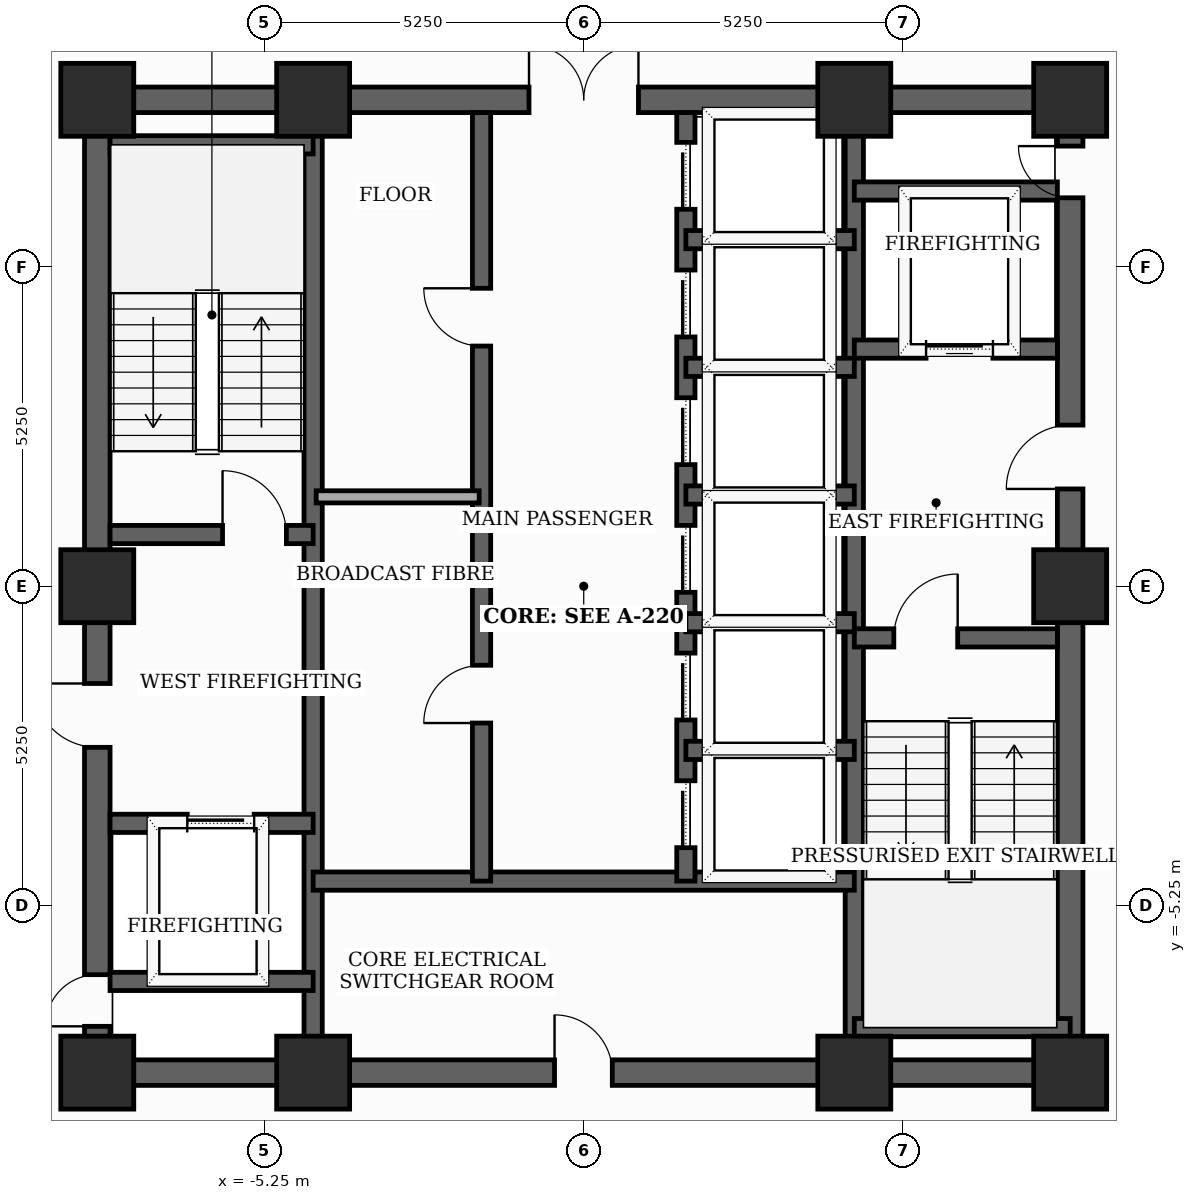
"""IFC4 building model, lengths in metres.
Left out: names, types, materials, properties, quantities, classifications, styles, units other than length and angle.
Written with IfcOpenShell. Run it as: python <this file> out.ifc"""

import sys

from ifc_helpers import new_model, si_unit, direction, frame, frame_2d, origin, origin_2d, place, context, subcontext, project, spatial, rectangle, extrude, element, fill, save


model = new_model("IFC4")
c1 = context("Model", 3, precision=1e-05, world=origin(), true_north=direction((0.0, 1.0)))
c2 = subcontext(c1, "Body", "Model", "MODEL_VIEW")
j1 = project(units=[si_unit("LENGTHUNIT", "METRE"), si_unit("PLANEANGLEUNIT", "RADIAN")], contexts=[c1])
p1 = place(None, origin())
s1 = spatial("IfcSite", under=j1, at=p1, CompositionType="ELEMENT")
p2 = place(p1, origin())
s2 = spatial("IfcBuilding", under=s1, at=p2, CompositionType="ELEMENT")
p3 = place(p2, frame((0.0, 0.0, 184.2)))
s3 = spatial("IfcBuildingStorey", under=s2, at=p3, CompositionType="ELEMENT", Elevation=184.2)
for number, where, z_axis, x_axis in (
    (1, (-8.0, -8.0, 0.0), (0.0, 0.0, 1.0), (1.0, 0.0, 0.0)),
    (2, (-4.45, -8.0, 0.0), (0.0, 0.0, 1.0), (1.0, 0.0, 0.0)),
    (3, (4.45, -8.0, 0.0), (0.0, 0.0, 1.0), (1.0, 0.0, 0.0)),
    (4, (8.0, -8.0, 0.0), (0.0, 0.0, 1.0), (1.0, 0.0, 0.0)),
    (5, (8.0, 0.0, 0.0), (0.0, 0.0, 1.0), (1.0, 0.0, 0.0)),
    (6, (8.0, 8.0, 0.0), (0.0, 0.0, 1.0), (1.0, 0.0, 0.0)),
    (7, (4.45, 8.0, 0.0), (0.0, 0.0, 1.0), (1.0, 0.0, 0.0)),
    (8, (-4.45, 8.0, 0.0), (0.0, 0.0, 1.0), (1.0, 0.0, 0.0)),
    (9, (-8.0, 8.0, 0.0), (0.0, 0.0, 1.0), (1.0, 0.0, 0.0)),
    (10, (-8.0, 0.0, 0.0), (0.0, 0.0, 1.0), (1.0, 0.0, 0.0)),
):
    element("IfcColumn", number, at=place(p3, frame(where, z_axis=z_axis, x_axis=x_axis)), inside=s3, PredefinedType="COLUMN", context=c2, shape_type="SweptSolid", body=[
        extrude(rectangle(XDim=1.2, YDim=1.2, at=origin_2d()), origin(), (0.0, 0.0, 1.0), 3.7),
    ])
p4 = place(p3, frame((-8.0, -8.0, 0.0), z_axis=(0.0, 0.0, 1.0), x_axis=(0.0, 1.0, 0.0)))
e11 = element("IfcWall", 11, at=p4, inside=s3, PredefinedType="SHEAR", context=c2, shape_type="SweptSolid", body=[
    extrude(rectangle(XDim=16.0, YDim=0.42, at=frame_2d((8.0, 0.0))), origin(), (0.0, 0.0, 1.0), 3.5),
])
p5 = place(p4, frame((0.761, 0.0, 0.0)))
e12 = element("IfcOpeningElement", 12, at=p5, cuts=e11, PredefinedType="OPENING", context=c2, shape_type="SweptSolid", body=[
    extrude(rectangle(XDim=0.85, YDim=2.02, at=frame_2d((0.425, 1.01))), frame((0.0, 0.22, 0.0), z_axis=(0.0, -1.0, 0.0), x_axis=(1.0, 0.0, 0.0)), (0.0, 0.0, 1.0), 0.44),
])
p6 = place(p4, frame((5.35, 0.0, 0.0)))
e13 = element("IfcOpeningElement", 13, at=p6, cuts=e11, PredefinedType="OPENING", context=c2, shape_type="SweptSolid", body=[
    extrude(rectangle(XDim=1.05, YDim=2.15, at=frame_2d((0.525, 1.075))), frame((0.0, 0.22, 0.0), z_axis=(0.0, -1.0, 0.0), x_axis=(1.0, 0.0, 0.0)), (0.0, 0.0, 1.0), 0.44),
])
p7 = place(p3, frame((8.0, -8.0, 0.0), z_axis=(0.0, 0.0, 1.0), x_axis=(0.0, 1.0, 0.0)))
e14 = element("IfcWall", 14, at=p7, inside=s3, PredefinedType="SHEAR", context=c2, shape_type="SweptSolid", body=[
    extrude(rectangle(XDim=16.0, YDim=0.42, at=frame_2d((8.0, 0.0))), origin(), (0.0, 0.0, 1.0), 3.5),
])
p8 = place(p7, frame((9.6, 0.0, 0.0)))
e15 = element("IfcOpeningElement", 15, at=p8, cuts=e14, PredefinedType="OPENING", context=c2, shape_type="SweptSolid", body=[
    extrude(rectangle(XDim=1.05, YDim=2.15, at=frame_2d((0.525, 1.075))), frame((0.0, 0.22, 0.0), z_axis=(0.0, -1.0, 0.0), x_axis=(1.0, 0.0, 0.0)), (0.0, 0.0, 1.0), 0.44),
])
p9 = place(p7, frame((14.389, 0.0, 0.0)))
e16 = element("IfcOpeningElement", 16, at=p9, cuts=e14, PredefinedType="OPENING", context=c2, shape_type="SweptSolid", body=[
    extrude(rectangle(XDim=0.85, YDim=2.02, at=frame_2d((0.425, 1.01))), frame((0.0, 0.22, 0.0), z_axis=(0.0, -1.0, 0.0), x_axis=(1.0, 0.0, 0.0)), (0.0, 0.0, 1.0), 0.44),
])
p10 = place(p3, frame((-8.0, -8.0, 0.0), z_axis=(0.0, 0.0, 1.0), x_axis=(1.0, 0.0, 0.0)))
e17 = element("IfcWall", 17, at=p10, inside=s3, PredefinedType="SHEAR", context=c2, shape_type="SweptSolid", body=[
    extrude(rectangle(XDim=16.0, YDim=0.42, at=frame_2d((8.0, 0.0))), origin(), (0.0, 0.0, 1.0), 3.5),
])
p11 = place(p10, frame((7.52, 0.0, 0.0)))
e18 = element("IfcOpeningElement", 18, at=p11, cuts=e17, PredefinedType="OPENING", context=c2, shape_type="SweptSolid", body=[
    extrude(rectangle(XDim=0.95, YDim=2.1, at=frame_2d((0.475, 1.05))), frame((0.0, 0.22, 0.0), z_axis=(0.0, -1.0, 0.0), x_axis=(1.0, 0.0, 0.0)), (0.0, 0.0, 1.0), 0.44),
])
p12 = place(p3, frame((-8.0, 8.0, 0.0), z_axis=(0.0, 0.0, 1.0), x_axis=(1.0, 0.0, 0.0)))
e19 = element("IfcWall", 19, at=p12, inside=s3, PredefinedType="SHEAR", context=c2, shape_type="SweptSolid", body=[
    extrude(rectangle(XDim=16.0, YDim=0.42, at=frame_2d((8.0, 0.0))), origin(), (0.0, 0.0, 1.0), 3.5),
])
p13 = place(p12, frame((7.1, 0.0, 0.0)))
e20 = element("IfcOpeningElement", 20, at=p13, cuts=e19, PredefinedType="OPENING", context=c2, shape_type="SweptSolid", body=[
    extrude(rectangle(XDim=1.8, YDim=2.15, at=frame_2d((0.9, 1.075))), frame((0.0, 0.22, 0.0), z_axis=(0.0, -1.0, 0.0), x_axis=(1.0, 0.0, 0.0)), (0.0, 0.0, 1.0), 0.44),
])
for number, where, z_axis, x_axis in (
    (21, (-4.45, -7.79, 0.0), (0.0, 0.0, 1.0), (0.0, 1.0, 0.0)),
    (22, (4.45, -7.79, 0.0), (0.0, 0.0, 1.0), (0.0, 1.0, 0.0)),
):
    element("IfcWall", number, at=place(p3, frame(where, z_axis=z_axis, x_axis=x_axis)), inside=s3, PredefinedType="SHEAR", context=c2, shape_type="SweptSolid", body=[
        extrude(rectangle(XDim=15.58, YDim=0.3, at=frame_2d((7.79, 0.0))), origin(), (0.0, 0.0, 1.0), 3.5),
    ])
p14 = place(p3, frame((-7.79, 0.85, 0.0), z_axis=(0.0, 0.0, 1.0), x_axis=(1.0, 0.0, 0.0)))
e23 = element("IfcWall", 23, at=p14, inside=s3, PredefinedType="SHEAR", context=c2, shape_type="SweptSolid", body=[
    extrude(rectangle(XDim=3.34, YDim=0.3, at=frame_2d((1.67, 0.0))), origin(), (0.0, 0.0, 1.0), 3.5),
])
p15 = place(p14, frame((1.85, 0.0, 0.0)))
e24 = element("IfcOpeningElement", 24, at=p15, cuts=e23, PredefinedType="OPENING", context=c2, shape_type="SweptSolid", body=[
    extrude(rectangle(XDim=1.05, YDim=2.15, at=frame_2d((0.525, 1.075))), frame((0.0, 0.16, 0.0), z_axis=(0.0, -1.0, 0.0), x_axis=(1.0, 0.0, 0.0)), (0.0, 0.0, 1.0), 0.32),
])
p16 = place(p3, frame((-7.79, 7.26, 0.0), z_axis=(0.0, 0.0, 1.0), x_axis=(1.0, 0.0, 0.0)))
e25 = element("IfcWall", 25, at=p16, inside=s3, PredefinedType="SHEAR", context=c2, shape_type="SweptSolid", body=[
    extrude(rectangle(XDim=3.34, YDim=0.3, at=frame_2d((1.67, 0.0))), origin(), (0.0, 0.0, 1.0), 3.5),
])
p17 = place(p3, frame((4.45, -0.85, 0.0), z_axis=(0.0, 0.0, 1.0), x_axis=(1.0, 0.0, 0.0)))
e26 = element("IfcWall", 26, at=p17, inside=s3, PredefinedType="SHEAR", context=c2, shape_type="SweptSolid", body=[
    extrude(rectangle(XDim=3.34, YDim=0.3, at=frame_2d((1.67, 0.0))), origin(), (0.0, 0.0, 1.0), 3.5),
])
p18 = place(p17, frame((0.65, 0.0, 0.0)))
e27 = element("IfcOpeningElement", 27, at=p18, cuts=e26, PredefinedType="OPENING", context=c2, shape_type="SweptSolid", body=[
    extrude(rectangle(XDim=1.05, YDim=2.15, at=frame_2d((0.525, 1.075))), frame((0.0, 0.16, 0.0), z_axis=(0.0, -1.0, 0.0), x_axis=(1.0, 0.0, 0.0)), (0.0, 0.0, 1.0), 0.32),
])
p19 = place(p3, frame((4.45, -7.26, 0.0), z_axis=(0.0, 0.0, 1.0), x_axis=(1.0, 0.0, 0.0)))
e28 = element("IfcWall", 28, at=p19, inside=s3, PredefinedType="SHEAR", context=c2, shape_type="SweptSolid", body=[
    extrude(rectangle(XDim=3.55, YDim=0.3, at=frame_2d((1.775, 0.0))), origin(), (0.0, 0.0, 1.0), 3.5),
])
p20 = place(p3, frame((-7.79, -3.9, 0.0), z_axis=(0.0, 0.0, 1.0), x_axis=(1.0, 0.0, 0.0)))
e29 = element("IfcWall", 29, at=p20, inside=s3, PredefinedType="SHEAR", context=c2, shape_type="SweptSolid", body=[
    extrude(rectangle(XDim=3.34, YDim=0.3, at=frame_2d((1.67, 0.0))), origin(), (0.0, 0.0, 1.0), 3.5),
])
p21 = place(p20, frame((1.27, 0.0, 0.0)))
e30 = element("IfcOpeningElement", 30, at=p21, cuts=e29, PredefinedType="OPENING", context=c2, shape_type="SweptSolid", body=[
    extrude(rectangle(XDim=1.1, YDim=2.1, at=frame_2d((0.55, 1.05))), frame((0.0, 0.16, 0.0), z_axis=(0.0, -1.0, 0.0), x_axis=(1.0, 0.0, 0.0)), (0.0, 0.0, 1.0), 0.32),
])
p22 = place(p3, frame((-7.79, -6.5, 0.0), z_axis=(0.0, 0.0, 1.0), x_axis=(1.0, 0.0, 0.0)))
e31 = element("IfcWall", 31, at=p22, inside=s3, PredefinedType="SHEAR", context=c2, shape_type="SweptSolid", body=[
    extrude(rectangle(XDim=3.34, YDim=0.3, at=frame_2d((1.67, 0.0))), origin(), (0.0, 0.0, 1.0), 3.5),
])
p23 = place(p3, frame((4.45, 3.9, 0.0), z_axis=(0.0, 0.0, 1.0), x_axis=(1.0, 0.0, 0.0)))
e32 = element("IfcWall", 32, at=p23, inside=s3, PredefinedType="SHEAR", context=c2, shape_type="SweptSolid", body=[
    extrude(rectangle(XDim=3.34, YDim=0.3, at=frame_2d((1.67, 0.0))), origin(), (0.0, 0.0, 1.0), 3.5),
])
p24 = place(p23, frame((1.18, 0.0, 0.0)))
e33 = element("IfcOpeningElement", 33, at=p24, cuts=e32, PredefinedType="OPENING", context=c2, shape_type="SweptSolid", body=[
    extrude(rectangle(XDim=1.1, YDim=2.1, at=frame_2d((0.55, 1.05))), frame((0.0, 0.16, 0.0), z_axis=(0.0, -1.0, 0.0), x_axis=(1.0, 0.0, 0.0)), (0.0, 0.0, 1.0), 0.32),
])
p25 = place(p3, frame((4.45, 6.5, 0.0), z_axis=(0.0, 0.0, 1.0), x_axis=(1.0, 0.0, 0.0)))
e34 = element("IfcWall", 34, at=p25, inside=s3, PredefinedType="SHEAR", context=c2, shape_type="SweptSolid", body=[
    extrude(rectangle(XDim=3.34, YDim=0.3, at=frame_2d((1.67, 0.0))), origin(), (0.0, 0.0, 1.0), 3.5),
])
p26 = place(p3, frame((-4.45, -4.85, 0.0), z_axis=(0.0, 0.0, 1.0), x_axis=(1.0, 0.0, 0.0)))
e35 = element("IfcWall", 35, at=p26, inside=s3, PredefinedType="SHEAR", context=c2, shape_type="SweptSolid", body=[
    extrude(rectangle(XDim=8.9, YDim=0.3, at=frame_2d((4.45, 0.0))), origin(), (0.0, 0.0, 1.0), 3.5),
])
p27 = place(p3, frame((-1.68, -4.85, 0.0), z_axis=(0.0, 0.0, 1.0), x_axis=(0.0, 1.0, 0.0)))
e36 = element("IfcWall", 36, at=p27, inside=s3, PredefinedType="SHEAR", context=c2, shape_type="SweptSolid", body=[
    extrude(rectangle(XDim=12.64, YDim=0.3, at=frame_2d((6.32, 0.0))), origin(), (0.0, 0.0, 1.0), 3.5),
])
p28 = place(p27, frame((2.6, 0.0, 0.0)))
e37 = element("IfcOpeningElement", 37, at=p28, cuts=e36, PredefinedType="OPENING", context=c2, shape_type="SweptSolid", body=[
    extrude(rectangle(XDim=0.95, YDim=2.1, at=frame_2d((0.475, 1.05))), frame((0.0, 0.16, 0.0), z_axis=(0.0, -1.0, 0.0), x_axis=(1.0, 0.0, 0.0)), (0.0, 0.0, 1.0), 0.32),
])
p29 = place(p27, frame((8.8, 0.0, 0.0)))
e38 = element("IfcOpeningElement", 38, at=p29, cuts=e36, PredefinedType="OPENING", context=c2, shape_type="SweptSolid", body=[
    extrude(rectangle(XDim=0.95, YDim=2.1, at=frame_2d((0.475, 1.05))), frame((0.0, 0.16, 0.0), z_axis=(0.0, -1.0, 0.0), x_axis=(1.0, 0.0, 0.0)), (0.0, 0.0, 1.0), 0.32),
])
p30 = place(p3, frame((1.68, -4.85, 0.0), z_axis=(0.0, 0.0, 1.0), x_axis=(0.0, 1.0, 0.0)))
e39 = element("IfcWall", 39, at=p30, inside=s3, PredefinedType="SHEAR", context=c2, shape_type="SweptSolid", body=[
    extrude(rectangle(XDim=12.64, YDim=0.3, at=frame_2d((6.32, 0.0))), origin(), (0.0, 0.0, 1.0), 3.5),
])
p31 = place(p30, frame((0.55, 0.0, 0.0)))
e40 = element("IfcOpeningElement", 40, at=p31, cuts=e39, PredefinedType="OPENING", context=c2, shape_type="SweptSolid", body=[
    extrude(rectangle(XDim=1.1, YDim=2.1, at=frame_2d((0.55, 1.05))), frame((0.0, 0.16, 0.0), z_axis=(0.0, -1.0, 0.0), x_axis=(1.0, 0.0, 0.0)), (0.0, 0.0, 1.0), 0.32),
])
p32 = place(p30, frame((2.65, 0.0, 0.0)))
e41 = element("IfcOpeningElement", 41, at=p32, cuts=e39, PredefinedType="OPENING", context=c2, shape_type="SweptSolid", body=[
    extrude(rectangle(XDim=1.1, YDim=2.1, at=frame_2d((0.55, 1.05))), frame((0.0, 0.16, 0.0), z_axis=(0.0, -1.0, 0.0), x_axis=(1.0, 0.0, 0.0)), (0.0, 0.0, 1.0), 0.32),
])
p33 = place(p30, frame((4.75, 0.0, 0.0)))
e42 = element("IfcOpeningElement", 42, at=p33, cuts=e39, PredefinedType="OPENING", context=c2, shape_type="SweptSolid", body=[
    extrude(rectangle(XDim=1.1, YDim=2.1, at=frame_2d((0.55, 1.05))), frame((0.0, 0.16, 0.0), z_axis=(0.0, -1.0, 0.0), x_axis=(1.0, 0.0, 0.0)), (0.0, 0.0, 1.0), 0.32),
])
p34 = place(p30, frame((6.85, 0.0, 0.0)))
e43 = element("IfcOpeningElement", 43, at=p34, cuts=e39, PredefinedType="OPENING", context=c2, shape_type="SweptSolid", body=[
    extrude(rectangle(XDim=1.1, YDim=2.1, at=frame_2d((0.55, 1.05))), frame((0.0, 0.16, 0.0), z_axis=(0.0, -1.0, 0.0), x_axis=(1.0, 0.0, 0.0)), (0.0, 0.0, 1.0), 0.32),
])
p35 = place(p30, frame((8.95, 0.0, 0.0)))
e44 = element("IfcOpeningElement", 44, at=p35, cuts=e39, PredefinedType="OPENING", context=c2, shape_type="SweptSolid", body=[
    extrude(rectangle(XDim=1.1, YDim=2.1, at=frame_2d((0.55, 1.05))), frame((0.0, 0.16, 0.0), z_axis=(0.0, -1.0, 0.0), x_axis=(1.0, 0.0, 0.0)), (0.0, 0.0, 1.0), 0.32),
])
p36 = place(p30, frame((11.05, 0.0, 0.0)))
e45 = element("IfcOpeningElement", 45, at=p36, cuts=e39, PredefinedType="OPENING", context=c2, shape_type="SweptSolid", body=[
    extrude(rectangle(XDim=1.1, YDim=2.1, at=frame_2d((0.55, 1.05))), frame((0.0, 0.16, 0.0), z_axis=(0.0, -1.0, 0.0), x_axis=(1.0, 0.0, 0.0)), (0.0, 0.0, 1.0), 0.32),
])
for number, where, z_axis, x_axis in (
    (46, (1.68, 1.5, 0.0), (0.0, 0.0, 1.0), (1.0, 0.0, 0.0)),
    (47, (1.68, 3.6, 0.0), (0.0, 0.0, 1.0), (1.0, 0.0, 0.0)),
    (48, (1.68, 5.7, 0.0), (0.0, 0.0, 1.0), (1.0, 0.0, 0.0)),
    (49, (1.68, -2.7, 0.0), (0.0, 0.0, 1.0), (1.0, 0.0, 0.0)),
    (50, (1.68, -0.6, 0.0), (0.0, 0.0, 1.0), (1.0, 0.0, 0.0)),
):
    element("IfcWall", number, at=place(p3, frame(where, z_axis=z_axis, x_axis=x_axis)), inside=s3, PredefinedType="SHEAR", context=c2, shape_type="SweptSolid", body=[
        extrude(rectangle(XDim=2.77, YDim=0.3, at=frame_2d((1.385, 0.0))), origin(), (0.0, 0.0, 1.0), 3.5),
    ])
p37 = place(p3, frame((-4.4, 1.47, 0.0), z_axis=(0.0, 0.0, 1.0), x_axis=(1.0, 0.0, 0.0)))
e51 = element("IfcWall", 51, at=p37, inside=s3, PredefinedType="SOLIDWALL", context=c2, shape_type="SweptSolid", body=[
    extrude(rectangle(XDim=2.68, YDim=0.2, at=frame_2d((1.34, 0.0))), origin(), (0.0, 0.0, 1.0), 3.5),
])
p38 = place(p5, origin())
e52 = element("IfcDoor", 52, at=p38, inside=s3, OperationType="SINGLE_SWING_LEFT", PredefinedType="TRAPDOOR", context=c2, shape_type="SweptSolid", body=[
    extrude(rectangle(XDim=0.85, YDim=2.02, at=frame_2d((0.425, 1.01))), frame((0.0, 0.025, 0.0), z_axis=(0.0, -1.0, 0.0), x_axis=(1.0, 0.0, 0.0)), (0.0, 0.0, 1.0), 0.05),
])
fill(e12, e52)
p39 = place(p6, origin())
e53 = element("IfcDoor", 53, at=p39, inside=s3, OperationType="SINGLE_SWING_RIGHT", PredefinedType="DOOR", context=c2, shape_type="SweptSolid", body=[
    extrude(rectangle(XDim=1.05, YDim=2.15, at=frame_2d((0.525, 1.075))), frame((0.0, 0.025, 0.0), z_axis=(0.0, -1.0, 0.0), x_axis=(1.0, 0.0, 0.0)), (0.0, 0.0, 1.0), 0.05),
])
fill(e13, e53)
p40 = place(p8, origin())
e54 = element("IfcDoor", 54, at=p40, inside=s3, OperationType="SINGLE_SWING_LEFT", PredefinedType="DOOR", context=c2, shape_type="SweptSolid", body=[
    extrude(rectangle(XDim=1.05, YDim=2.15, at=frame_2d((0.525, 1.075))), frame((0.0, 0.025, 0.0), z_axis=(0.0, -1.0, 0.0), x_axis=(1.0, 0.0, 0.0)), (0.0, 0.0, 1.0), 0.05),
])
fill(e15, e54)
p41 = place(p9, origin())
e55 = element("IfcDoor", 55, at=p41, inside=s3, OperationType="SINGLE_SWING_RIGHT", PredefinedType="TRAPDOOR", context=c2, shape_type="SweptSolid", body=[
    extrude(rectangle(XDim=0.85, YDim=2.02, at=frame_2d((0.425, 1.01))), frame((0.0, 0.025, 0.0), z_axis=(0.0, -1.0, 0.0), x_axis=(1.0, 0.0, 0.0)), (0.0, 0.0, 1.0), 0.05),
])
fill(e16, e55)
p42 = place(p11, origin())
e56 = element("IfcDoor", 56, at=p42, inside=s3, OperationType="SINGLE_SWING_LEFT", PredefinedType="DOOR", context=c2, shape_type="SweptSolid", body=[
    extrude(rectangle(XDim=0.95, YDim=2.1, at=frame_2d((0.475, 1.05))), frame((0.0, 0.025, 0.0), z_axis=(0.0, -1.0, 0.0), x_axis=(1.0, 0.0, 0.0)), (0.0, 0.0, 1.0), 0.05),
])
fill(e18, e56)
p43 = place(p13, origin())
e57 = element("IfcDoor", 57, at=p43, inside=s3, OperationType="DOUBLE_DOOR_SINGLE_SWING", PredefinedType="DOOR", context=c2, shape_type="SweptSolid", body=[
    extrude(rectangle(XDim=1.8, YDim=2.15, at=frame_2d((0.9, 1.075))), frame((0.0, 0.025, 0.0), z_axis=(0.0, -1.0, 0.0), x_axis=(1.0, 0.0, 0.0)), (0.0, 0.0, 1.0), 0.05),
])
fill(e20, e57)
p44 = place(p15, origin())
e58 = element("IfcDoor", 58, at=p44, inside=s3, OperationType="SINGLE_SWING_LEFT", PredefinedType="DOOR", context=c2, shape_type="SweptSolid", body=[
    extrude(rectangle(XDim=1.05, YDim=2.15, at=frame_2d((0.525, 1.075))), frame((0.0, 0.025, 0.0), z_axis=(0.0, -1.0, 0.0), x_axis=(1.0, 0.0, 0.0)), (0.0, 0.0, 1.0), 0.05),
])
fill(e24, e58)
p45 = place(p18, origin())
e59 = element("IfcDoor", 59, at=p45, inside=s3, OperationType="SINGLE_SWING_RIGHT", PredefinedType="DOOR", context=c2, shape_type="SweptSolid", body=[
    extrude(rectangle(XDim=1.05, YDim=2.15, at=frame_2d((0.525, 1.075))), frame((0.0, 0.025, 0.0), z_axis=(0.0, -1.0, 0.0), x_axis=(1.0, 0.0, 0.0)), (0.0, 0.0, 1.0), 0.05),
])
fill(e27, e59)
p46 = place(p21, origin())
e60 = element("IfcDoor", 60, at=p46, inside=s3, OperationType="SLIDING_TO_LEFT", PredefinedType="DOOR", context=c2, shape_type="SweptSolid", body=[
    extrude(rectangle(XDim=1.1, YDim=2.1, at=frame_2d((0.55, 1.05))), frame((0.0, 0.025, 0.0), z_axis=(0.0, -1.0, 0.0), x_axis=(1.0, 0.0, 0.0)), (0.0, 0.0, 1.0), 0.05),
])
fill(e30, e60)
p47 = place(p24, origin())
e61 = element("IfcDoor", 61, at=p47, inside=s3, OperationType="SLIDING_TO_LEFT", PredefinedType="DOOR", context=c2, shape_type="SweptSolid", body=[
    extrude(rectangle(XDim=1.1, YDim=2.1, at=frame_2d((0.55, 1.05))), frame((0.0, 0.025, 0.0), z_axis=(0.0, -1.0, 0.0), x_axis=(1.0, 0.0, 0.0)), (0.0, 0.0, 1.0), 0.05),
])
fill(e33, e61)
p48 = place(p28, origin())
e62 = element("IfcDoor", 62, at=p48, inside=s3, OperationType="SINGLE_SWING_LEFT", PredefinedType="DOOR", context=c2, shape_type="SweptSolid", body=[
    extrude(rectangle(XDim=0.95, YDim=2.1, at=frame_2d((0.475, 1.05))), frame((0.0, 0.025, 0.0), z_axis=(0.0, -1.0, 0.0), x_axis=(1.0, 0.0, 0.0)), (0.0, 0.0, 1.0), 0.05),
])
fill(e37, e62)
p49 = place(p29, origin())
e63 = element("IfcDoor", 63, at=p49, inside=s3, OperationType="SINGLE_SWING_RIGHT", PredefinedType="DOOR", context=c2, shape_type="SweptSolid", body=[
    extrude(rectangle(XDim=0.95, YDim=2.1, at=frame_2d((0.475, 1.05))), frame((0.0, 0.025, 0.0), z_axis=(0.0, -1.0, 0.0), x_axis=(1.0, 0.0, 0.0)), (0.0, 0.0, 1.0), 0.05),
])
fill(e38, e63)
p50 = place(p31, origin())
e64 = element("IfcDoor", 64, at=p50, inside=s3, OperationType="SLIDING_TO_LEFT", PredefinedType="DOOR", context=c2, shape_type="SweptSolid", body=[
    extrude(rectangle(XDim=1.1, YDim=2.1, at=frame_2d((0.55, 1.05))), frame((0.0, 0.025, 0.0), z_axis=(0.0, -1.0, 0.0), x_axis=(1.0, 0.0, 0.0)), (0.0, 0.0, 1.0), 0.05),
])
fill(e40, e64)
p51 = place(p32, origin())
e65 = element("IfcDoor", 65, at=p51, inside=s3, OperationType="SLIDING_TO_LEFT", PredefinedType="DOOR", context=c2, shape_type="SweptSolid", body=[
    extrude(rectangle(XDim=1.1, YDim=2.1, at=frame_2d((0.55, 1.05))), frame((0.0, 0.025, 0.0), z_axis=(0.0, -1.0, 0.0), x_axis=(1.0, 0.0, 0.0)), (0.0, 0.0, 1.0), 0.05),
])
fill(e41, e65)
p52 = place(p33, origin())
e66 = element("IfcDoor", 66, at=p52, inside=s3, OperationType="SLIDING_TO_LEFT", PredefinedType="DOOR", context=c2, shape_type="SweptSolid", body=[
    extrude(rectangle(XDim=1.1, YDim=2.1, at=frame_2d((0.55, 1.05))), frame((0.0, 0.025, 0.0), z_axis=(0.0, -1.0, 0.0), x_axis=(1.0, 0.0, 0.0)), (0.0, 0.0, 1.0), 0.05),
])
fill(e42, e66)
p53 = place(p34, origin())
e67 = element("IfcDoor", 67, at=p53, inside=s3, OperationType="SLIDING_TO_LEFT", PredefinedType="DOOR", context=c2, shape_type="SweptSolid", body=[
    extrude(rectangle(XDim=1.1, YDim=2.1, at=frame_2d((0.55, 1.05))), frame((0.0, 0.025, 0.0), z_axis=(0.0, -1.0, 0.0), x_axis=(1.0, 0.0, 0.0)), (0.0, 0.0, 1.0), 0.05),
])
fill(e43, e67)
p54 = place(p35, origin())
e68 = element("IfcDoor", 68, at=p54, inside=s3, OperationType="SLIDING_TO_LEFT", PredefinedType="DOOR", context=c2, shape_type="SweptSolid", body=[
    extrude(rectangle(XDim=1.1, YDim=2.1, at=frame_2d((0.55, 1.05))), frame((0.0, 0.025, 0.0), z_axis=(0.0, -1.0, 0.0), x_axis=(1.0, 0.0, 0.0)), (0.0, 0.0, 1.0), 0.05),
])
fill(e44, e68)
p55 = place(p36, origin())
e69 = element("IfcDoor", 69, at=p55, inside=s3, OperationType="SLIDING_TO_LEFT", PredefinedType="DOOR", context=c2, shape_type="SweptSolid", body=[
    extrude(rectangle(XDim=1.1, YDim=2.1, at=frame_2d((0.55, 1.05))), frame((0.0, 0.025, 0.0), z_axis=(0.0, -1.0, 0.0), x_axis=(1.0, 0.0, 0.0)), (0.0, 0.0, 1.0), 0.05),
])
fill(e45, e69)
save(model, sys.argv[1])
